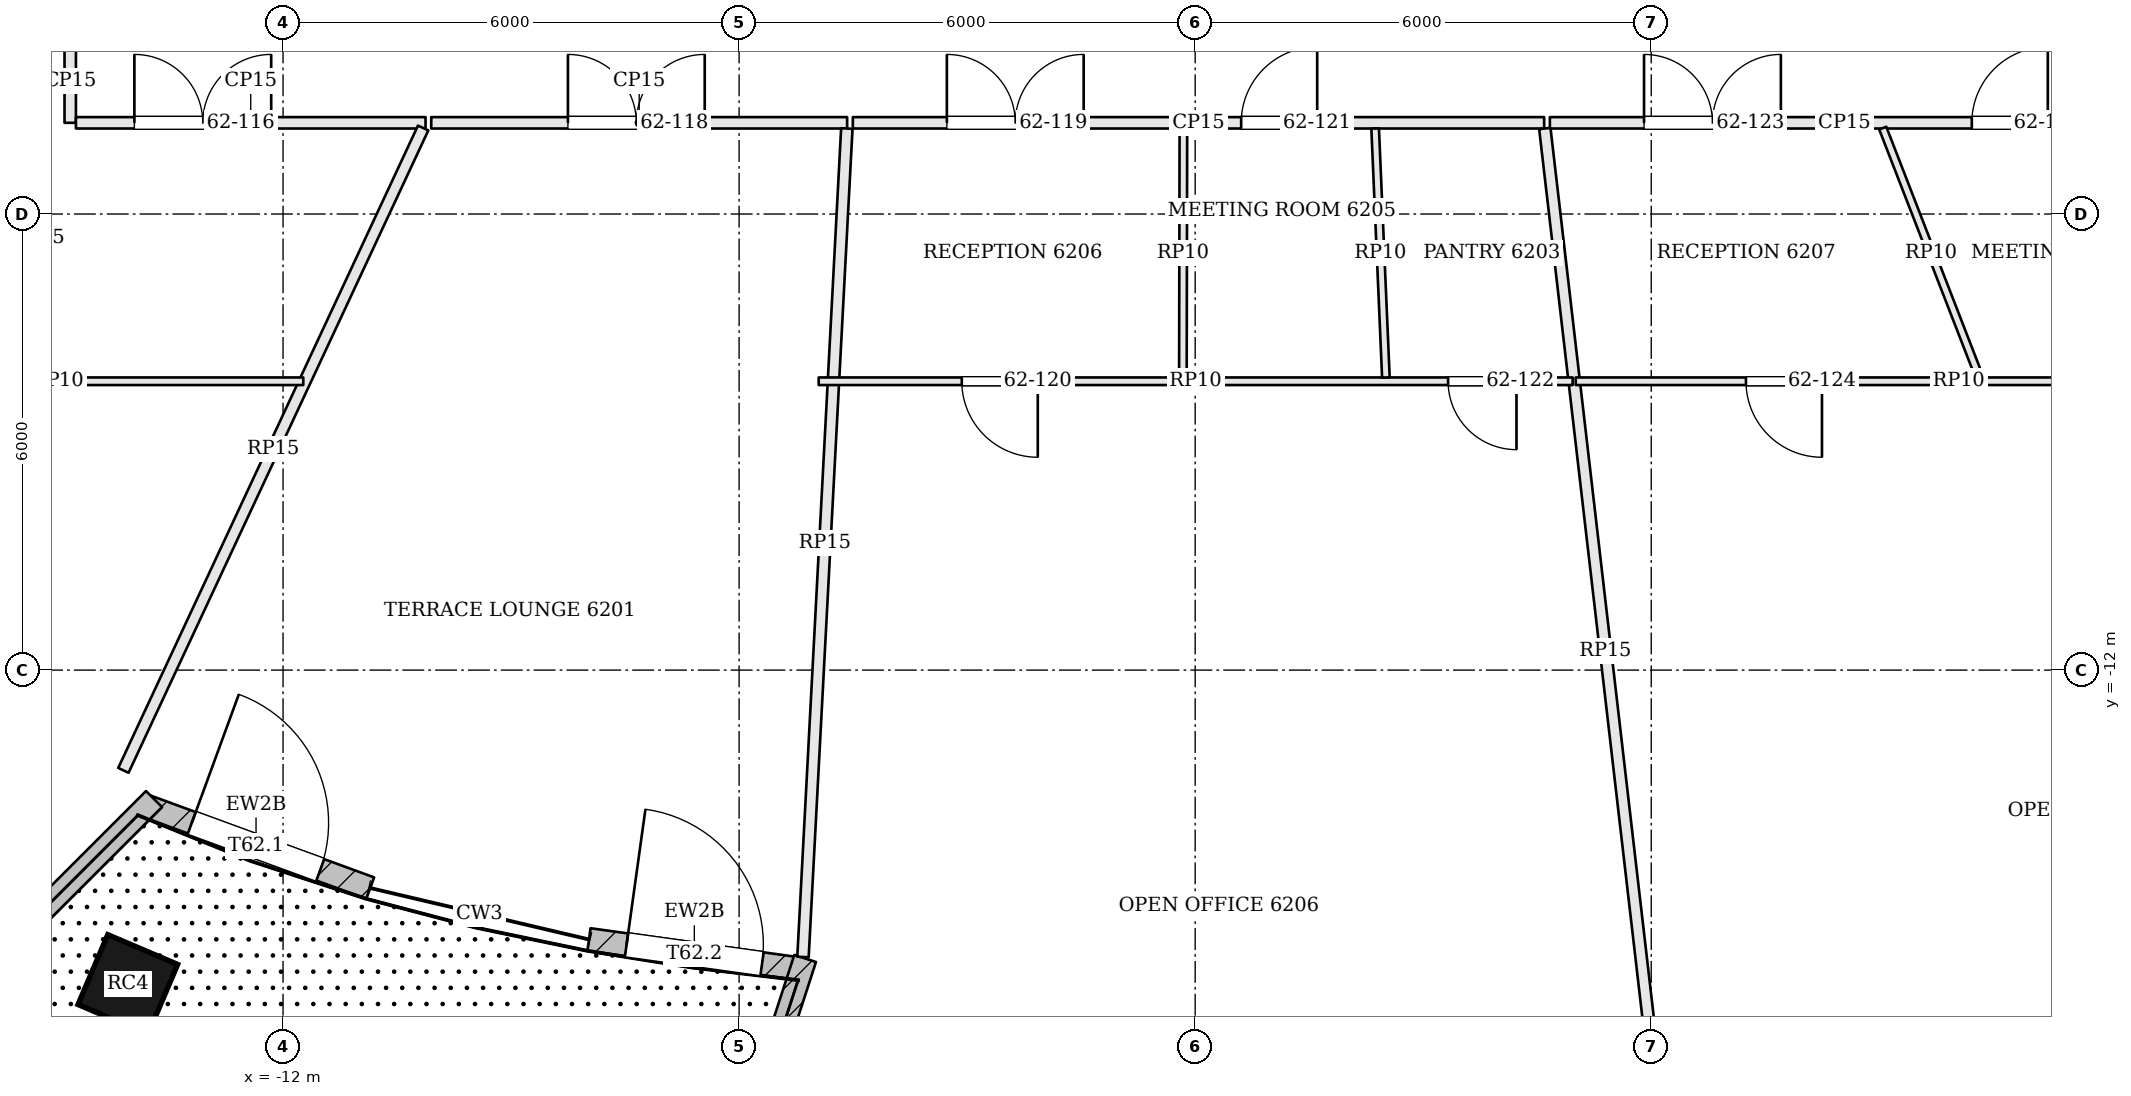
"""IFC4 building model, lengths in metres.
Left out: names, types, materials, properties, quantities, classifications, styles, units other than length and angle.
Written with IfcOpenShell. Run it as: python <this file> out.ifc"""

import sys

from ifc_helpers import new_model, si_unit, direction, frame, frame_2d, origin, origin_2d, place, context, subcontext, project, spatial, rectangle, extrude, element, fill, save


model = new_model("IFC4")
c1 = context("Model", 3, precision=1e-05, world=origin(), true_north=direction((0.0, 1.0)))
c2 = subcontext(c1, "Body", "Model", "MODEL_VIEW")
j1 = project(units=[si_unit("LENGTHUNIT", "METRE"), si_unit("PLANEANGLEUNIT", "RADIAN")], contexts=[c1])
p1 = place(None, origin())
s1 = spatial("IfcSite", under=j1, at=p1, CompositionType="ELEMENT")
p2 = place(p1, origin())
s2 = spatial("IfcBuilding", under=s1, at=p2, CompositionType="ELEMENT")
p3 = place(p2, frame((0.0, 0.0, 252.6)))
s3 = spatial("IfcBuildingStorey", under=s2, at=p3, CompositionType="ELEMENT", Elevation=252.6)
p4 = place(p3, frame((-14.042, -16.136, 0.0), z_axis=(0.0, 0.0, 1.0), x_axis=(0.920167856842, -0.391524092789, 0.0)))
e1 = element("IfcColumn", 1, at=p4, inside=s3, PredefinedType="COLUMN", context=c2, shape_type="SweptSolid", body=[
    extrude(rectangle(XDim=1.0, YDim=1.0, at=origin_2d()), origin(), (0.0, 0.0, 1.0), 3.9),
])
p5 = place(p3, frame((-13.857, -13.768, 0.0), z_axis=(0.0, 0.0, 1.0), x_axis=(0.939035731174, -0.343819568347, 0.0)))
e2 = element("IfcWall", 2, at=p5, inside=s3, PredefinedType="SOLIDWALL", context=c2, shape_type="SweptSolid", body=[
    extrude(rectangle(XDim=3.199, YDim=0.3, at=frame_2d((1.6, 0.0))), origin(), (0.0, 0.0, 1.0), 3.104),
])
p6 = place(p5, frame((0.699, 0.0, 0.0)))
e3 = element("IfcOpeningElement", 3, at=p6, cuts=e2, PredefinedType="OPENING", context=c2, shape_type="SweptSolid", body=[
    extrude(rectangle(XDim=1.8, YDim=2.4, at=frame_2d((0.9, 1.2))), frame((0.0, 0.16, 0.0), z_axis=(0.0, -1.0, 0.0), x_axis=(1.0, 0.0, 0.0)), (0.0, 0.0, 1.0), 0.32),
])
p7 = place(p3, frame((-7.975, -15.544, 0.0), z_axis=(0.0, 0.0, 1.0), x_axis=(0.990444006368, -0.137915446016, 0.0)))
e4 = element("IfcWall", 4, at=p7, inside=s3, PredefinedType="SOLIDWALL", context=c2, shape_type="SweptSolid", body=[
    extrude(rectangle(XDim=2.799, YDim=0.3, at=frame_2d((1.399, 0.0))), origin(), (0.0, 0.0, 1.0), 3.104),
])
p8 = place(p7, frame((0.5, 0.0, 0.0)))
e5 = element("IfcOpeningElement", 5, at=p8, cuts=e4, PredefinedType="OPENING", context=c2, shape_type="SweptSolid", body=[
    extrude(rectangle(XDim=1.8, YDim=2.4, at=frame_2d((0.9, 1.2))), frame((0.0, 0.16, 0.0), z_axis=(0.0, -1.0, 0.0), x_axis=(1.0, 0.0, 0.0)), (0.0, 0.0, 1.0), 0.32),
])
p9 = place(p3, frame((-17.976, -17.976, 0.0), z_axis=(0.0, 0.0, 1.0), x_axis=(0.707106781187, 0.707106781187, 0.0)))
e6 = element("IfcWall", 6, at=p9, inside=s3, PredefinedType="SOLIDWALL", context=c2, shape_type="SweptSolid", body=[
    extrude(rectangle(XDim=6.052, YDim=0.3, at=frame_2d((3.026, 0.0))), origin(), (0.0, 0.0, 1.0), 3.254),
])
p10 = place(p3, frame((-7.051, -21.701, 0.0), z_axis=(0.0, 0.0, 1.0), x_axis=(0.309061186731, 0.951042156193, 0.0)))
e7 = element("IfcWall", 7, at=p10, inside=s3, PredefinedType="SOLIDWALL", context=c2, shape_type="SweptSolid", body=[
    extrude(rectangle(XDim=6.211, YDim=0.3, at=frame_2d((3.106, 0.0))), origin(), (0.0, 0.0, 1.0), 3.254),
])
p11 = place(p3, frame((-24.363, -8.04, 0.0), z_axis=(0.0, 0.0, 1.0), x_axis=(0.907507429398, 0.420036028916, 0.0)))
e8 = element("IfcWall", 8, at=p11, inside=s3, PredefinedType="PARTITIONING", context=c2, shape_type="SweptSolid", body=[
    extrude(rectangle(XDim=10.463, YDim=0.15, at=frame_2d((5.231, 0.0))), origin(), (0.0, 0.0, 1.0), 3.084),
])
p12 = place(p3, frame((-14.8, -3.688, 0.0), z_axis=(0.0, 0.0, 1.0), x_axis=(0.0, -1.0, 0.0)))
e9 = element("IfcWall", 9, at=p12, inside=s3, PredefinedType="PARTITIONING", context=c2, shape_type="SweptSolid", body=[
    extrude(rectangle(XDim=1.112, YDim=0.15, at=frame_2d((0.556, 0.0))), origin(), (0.0, 0.0, 1.0), 3.084),
])
p13 = place(p3, frame((-14.725, -4.8, 0.0), z_axis=(0.0, 0.0, 1.0), x_axis=(1.0, 0.0, 0.0)))
e10 = element("IfcWall", 10, at=p13, inside=s3, PredefinedType="PARTITIONING", context=c2, shape_type="SweptSolid", body=[
    extrude(rectangle(XDim=4.6, YDim=0.15, at=frame_2d((2.3, 0.0))), origin(), (0.0, 0.0, 1.0), 3.084),
])
p14 = place(p13, frame((0.769, 0.0, 0.0)))
e11 = element("IfcOpeningElement", 11, at=p14, cuts=e10, PredefinedType="OPENING", context=c2, shape_type="SweptSolid", body=[
    extrude(rectangle(XDim=1.8, YDim=2.1, at=frame_2d((0.9, 1.05))), frame((0.0, 0.085, 0.0), z_axis=(0.0, -1.0, 0.0), x_axis=(1.0, 0.0, 0.0)), (0.0, 0.0, 1.0), 0.17),
])
p15 = place(p3, frame((-14.1, -13.319, 0.0), z_axis=(0.0, 0.0, 1.0), x_axis=(0.422849635533, 0.906199859705, 0.0)))
e12 = element("IfcWall", 12, at=p15, inside=s3, PredefinedType="PARTITIONING", context=c2, shape_type="SweptSolid", body=[
    extrude(rectangle(XDim=9.326, YDim=0.15, at=frame_2d((4.663, 0.0))), origin(), (0.0, 0.0, 1.0), 3.084),
])
p16 = place(p3, frame((-10.05, -4.8, 0.0), z_axis=(0.0, 0.0, 1.0), x_axis=(1.0, 0.0, 0.0)))
e13 = element("IfcWall", 13, at=p16, inside=s3, PredefinedType="PARTITIONING", context=c2, shape_type="SweptSolid", body=[
    extrude(rectangle(XDim=5.471, YDim=0.15, at=frame_2d((2.736, 0.0))), origin(), (0.0, 0.0, 1.0), 3.084),
])
p17 = place(p16, frame((1.798, 0.0, 0.0)))
e14 = element("IfcOpeningElement", 14, at=p17, cuts=e13, PredefinedType="OPENING", context=c2, shape_type="SweptSolid", body=[
    extrude(rectangle(XDim=1.8, YDim=2.1, at=frame_2d((0.9, 1.05))), frame((0.0, 0.085, 0.0), z_axis=(0.0, -1.0, 0.0), x_axis=(1.0, 0.0, 0.0)), (0.0, 0.0, 1.0), 0.17),
])
p18 = place(p3, frame((-5.16, -15.774, 0.0), z_axis=(0.0, 0.0, 1.0), x_axis=(0.052855857128, 0.998602152194, 0.0)))
e15 = element("IfcWall", 15, at=p18, inside=s3, PredefinedType="PARTITIONING", context=c2, shape_type="SweptSolid", body=[
    extrude(rectangle(XDim=10.915, YDim=0.15, at=frame_2d((5.457, 0.0))), origin(), (0.0, 0.0, 1.0), 3.084),
])
p19 = place(p3, frame((-4.504, -4.8, 0.0), z_axis=(0.0, 0.0, 1.0), x_axis=(1.0, 0.0, 0.0)))
e16 = element("IfcWall", 16, at=p19, inside=s3, PredefinedType="PARTITIONING", context=c2, shape_type="SweptSolid", body=[
    extrude(rectangle(XDim=9.095, YDim=0.15, at=frame_2d((4.548, 0.0))), origin(), (0.0, 0.0, 1.0), 3.084),
])
p20 = place(p19, frame((1.237, 0.0, 0.0)))
e17 = element("IfcOpeningElement", 17, at=p20, cuts=e16, PredefinedType="OPENING", context=c2, shape_type="SweptSolid", body=[
    extrude(rectangle(XDim=1.8, YDim=2.1, at=frame_2d((0.9, 1.05))), frame((0.0, 0.085, 0.0), z_axis=(0.0, -1.0, 0.0), x_axis=(1.0, 0.0, 0.0)), (0.0, 0.0, 1.0), 0.17),
])
p21 = place(p19, frame((5.109, 0.0, 0.0)))
e18 = element("IfcOpeningElement", 18, at=p21, cuts=e16, PredefinedType="OPENING", context=c2, shape_type="SweptSolid", body=[
    extrude(rectangle(XDim=1.0, YDim=2.4, at=frame_2d((0.5, 1.2))), frame((0.0, 0.085, 0.0), z_axis=(0.0, -1.0, 0.0), x_axis=(1.0, 0.0, 0.0)), (0.0, 0.0, 1.0), 0.17),
])
p22 = place(p3, frame((6.197, -18.616, 0.0), z_axis=(0.0, 0.0, 1.0), x_axis=(-0.115396385648, 0.993319522701, 0.0)))
e19 = element("IfcWall", 19, at=p22, inside=s3, PredefinedType="PARTITIONING", context=c2, shape_type="SweptSolid", body=[
    extrude(rectangle(XDim=13.834, YDim=0.15, at=frame_2d((6.917, 0.0))), origin(), (0.0, 0.0, 1.0), 3.084),
])
p23 = place(p3, frame((4.667, -4.8, 0.0), z_axis=(0.0, 0.0, 1.0), x_axis=(1.0, 0.0, 0.0)))
e20 = element("IfcWall", 20, at=p23, inside=s3, PredefinedType="PARTITIONING", context=c2, shape_type="SweptSolid", body=[
    extrude(rectangle(XDim=7.75, YDim=0.15, at=frame_2d((3.875, 0.0))), origin(), (0.0, 0.0, 1.0), 3.084),
])
p24 = place(p23, frame((1.239, 0.0, 0.0)))
e21 = element("IfcOpeningElement", 21, at=p24, cuts=e20, PredefinedType="OPENING", context=c2, shape_type="SweptSolid", body=[
    extrude(rectangle(XDim=1.8, YDim=2.1, at=frame_2d((0.9, 1.05))), frame((0.0, 0.085, 0.0), z_axis=(0.0, -1.0, 0.0), x_axis=(1.0, 0.0, 0.0)), (0.0, 0.0, 1.0), 0.17),
])
p25 = place(p23, frame((5.551, 0.0, 0.0)))
e22 = element("IfcOpeningElement", 22, at=p25, cuts=e20, PredefinedType="OPENING", context=c2, shape_type="SweptSolid", body=[
    extrude(rectangle(XDim=1.0, YDim=2.4, at=frame_2d((0.5, 1.2))), frame((0.0, 0.085, 0.0), z_axis=(0.0, -1.0, 0.0), x_axis=(1.0, 0.0, 0.0)), (0.0, 0.0, 1.0), 0.17),
])
p26 = place(p3, frame((-11.734, -8.2, 0.0), z_axis=(0.0, 0.0, 1.0), x_axis=(-1.0, 0.0, 0.0)))
e23 = element("IfcWall", 23, at=p26, inside=s3, PredefinedType="PARTITIONING", context=c2, shape_type="SweptSolid", body=[
    extrude(rectangle(XDim=6.466, YDim=0.1, at=frame_2d((3.233, 0.0))), origin(), (0.0, 0.0, 1.0), 3.084),
])
p27 = place(p26, frame((4.233, 0.0, 0.0)))
e24 = element("IfcOpeningElement", 24, at=p27, cuts=e23, PredefinedType="OPENING", context=c2, shape_type="SweptSolid", body=[
    extrude(rectangle(XDim=1.0, YDim=2.1, at=frame_2d((0.5, 1.05))), frame((0.0, 0.06, 0.0), z_axis=(0.0, -1.0, 0.0), x_axis=(1.0, 0.0, 0.0)), (0.0, 0.0, 1.0), 0.12),
])
p28 = place(p3, frame((4.966, -8.2, 0.0), z_axis=(0.0, 0.0, 1.0), x_axis=(-1.0, 0.0, 0.0)))
e25 = element("IfcWall", 25, at=p28, inside=s3, PredefinedType="PARTITIONING", context=c2, shape_type="SweptSolid", body=[
    extrude(rectangle(XDim=9.919, YDim=0.1, at=frame_2d((4.959, 0.0))), origin(), (0.0, 0.0, 1.0), 3.084),
])
p29 = place(p28, frame((7.037, 0.0, 0.0)))
e26 = element("IfcOpeningElement", 26, at=p29, cuts=e25, PredefinedType="OPENING", context=c2, shape_type="SweptSolid", body=[
    extrude(rectangle(XDim=1.0, YDim=2.1, at=frame_2d((0.5, 1.05))), frame((0.0, 0.06, 0.0), z_axis=(0.0, -1.0, 0.0), x_axis=(1.0, 0.0, 0.0)), (0.0, 0.0, 1.0), 0.12),
])
p30 = place(p28, frame((0.739, 0.0, 0.0)))
e27 = element("IfcOpeningElement", 27, at=p30, cuts=e25, PredefinedType="OPENING", context=c2, shape_type="SweptSolid", body=[
    extrude(rectangle(XDim=0.9, YDim=2.1, at=frame_2d((0.45, 1.05))), frame((0.0, 0.06, 0.0), z_axis=(0.0, -1.0, 0.0), x_axis=(1.0, 0.0, 0.0)), (0.0, 0.0, 1.0), 0.12),
])
p31 = place(p3, frame((-0.155, -4.875, 0.0), z_axis=(0.0, 0.0, 1.0), x_axis=(-0.002012818347, -0.999997974279, 0.0)))
e28 = element("IfcWall", 28, at=p31, inside=s3, PredefinedType="PARTITIONING", context=c2, shape_type="SweptSolid", body=[
    extrude(rectangle(XDim=3.275, YDim=0.1, at=frame_2d((1.637, 0.0))), origin(), (0.0, 0.0, 1.0), 3.084),
])
p32 = place(p3, frame((2.368, -4.875, 0.0), z_axis=(0.0, 0.0, 1.0), x_axis=(0.043123705059, -0.999069740339, 0.0)))
e29 = element("IfcWall", 29, at=p32, inside=s3, PredefinedType="PARTITIONING", context=c2, shape_type="SweptSolid", body=[
    extrude(rectangle(XDim=3.278, YDim=0.1, at=frame_2d((1.639, 0.0))), origin(), (0.0, 0.0, 1.0), 3.084),
])
p33 = place(p3, frame((15.087, -8.2, 0.0), z_axis=(0.0, 0.0, 1.0), x_axis=(-1.0, 0.0, 0.0)))
e30 = element("IfcWall", 30, at=p33, inside=s3, PredefinedType="PARTITIONING", context=c2, shape_type="SweptSolid", body=[
    extrude(rectangle(XDim=10.081, YDim=0.1, at=frame_2d((5.041, 0.0))), origin(), (0.0, 0.0, 1.0), 3.084),
])
p34 = place(p33, frame((6.841, 0.0, 0.0)))
e31 = element("IfcOpeningElement", 31, at=p34, cuts=e30, PredefinedType="OPENING", context=c2, shape_type="SweptSolid", body=[
    extrude(rectangle(XDim=1.0, YDim=2.1, at=frame_2d((0.5, 1.05))), frame((0.0, 0.06, 0.0), z_axis=(0.0, -1.0, 0.0), x_axis=(1.0, 0.0, 0.0)), (0.0, 0.0, 1.0), 0.12),
])
p35 = place(p3, frame((9.046, -4.87, 0.0), z_axis=(0.0, 0.0, 1.0), x_axis=(0.361773794961, -0.93226590696, 0.0)))
e32 = element("IfcWall", 32, at=p35, inside=s3, PredefinedType="PARTITIONING", context=c2, shape_type="SweptSolid", body=[
    extrude(rectangle(XDim=3.522, YDim=0.1, at=frame_2d((1.761, 0.0))), origin(), (0.0, 0.0, 1.0), 3.084),
])
p36 = place(p6, origin())
e33 = element("IfcDoor", 33, at=p36, inside=s3, OperationType="DOUBLE_DOOR_DOUBLE_SWING", PredefinedType="DOOR", context=c2, shape_type="SweptSolid", body=[
    extrude(rectangle(XDim=1.8, YDim=2.4, at=frame_2d((0.9, 1.2))), frame((0.0, 0.025, 0.0), z_axis=(0.0, -1.0, 0.0), x_axis=(1.0, 0.0, 0.0)), (0.0, 0.0, 1.0), 0.05),
])
fill(e3, e33)
p37 = place(p8, origin())
e34 = element("IfcDoor", 34, at=p37, inside=s3, OperationType="DOUBLE_DOOR_DOUBLE_SWING", PredefinedType="DOOR", context=c2, shape_type="SweptSolid", body=[
    extrude(rectangle(XDim=1.8, YDim=2.4, at=frame_2d((0.9, 1.2))), frame((0.0, 0.025, 0.0), z_axis=(0.0, -1.0, 0.0), x_axis=(1.0, 0.0, 0.0)), (0.0, 0.0, 1.0), 0.05),
])
fill(e5, e34)
p38 = place(p14, origin())
e35 = element("IfcDoor", 35, at=p38, inside=s3, OperationType="DOUBLE_DOOR_SINGLE_SWING", PredefinedType="DOOR", context=c2, shape_type="SweptSolid", body=[
    extrude(rectangle(XDim=1.8, YDim=2.1, at=frame_2d((0.9, 1.05))), frame((0.0, 0.025, 0.0), z_axis=(0.0, -1.0, 0.0), x_axis=(1.0, 0.0, 0.0)), (0.0, 0.0, 1.0), 0.05),
])
fill(e11, e35)
p39 = place(p17, origin())
e36 = element("IfcDoor", 36, at=p39, inside=s3, OperationType="DOUBLE_DOOR_SINGLE_SWING", PredefinedType="DOOR", context=c2, shape_type="SweptSolid", body=[
    extrude(rectangle(XDim=1.8, YDim=2.1, at=frame_2d((0.9, 1.05))), frame((0.0, 0.025, 0.0), z_axis=(0.0, -1.0, 0.0), x_axis=(1.0, 0.0, 0.0)), (0.0, 0.0, 1.0), 0.05),
])
fill(e14, e36)
p40 = place(p20, origin())
e37 = element("IfcDoor", 37, at=p40, inside=s3, OperationType="DOUBLE_DOOR_SINGLE_SWING", PredefinedType="DOOR", context=c2, shape_type="SweptSolid", body=[
    extrude(rectangle(XDim=1.8, YDim=2.1, at=frame_2d((0.9, 1.05))), frame((0.0, 0.025, 0.0), z_axis=(0.0, -1.0, 0.0), x_axis=(1.0, 0.0, 0.0)), (0.0, 0.0, 1.0), 0.05),
])
fill(e17, e37)
p41 = place(p29, origin())
e38 = element("IfcDoor", 38, at=p41, inside=s3, OperationType="SINGLE_SWING_LEFT", PredefinedType="DOOR", context=c2, shape_type="SweptSolid", body=[
    extrude(rectangle(XDim=1.0, YDim=2.1, at=frame_2d((0.5, 1.05))), frame((0.0, 0.025, 0.0), z_axis=(0.0, -1.0, 0.0), x_axis=(1.0, 0.0, 0.0)), (0.0, 0.0, 1.0), 0.05),
])
fill(e26, e38)
p42 = place(p21, origin())
e39 = element("IfcDoor", 39, at=p42, inside=s3, OperationType="SINGLE_SWING_RIGHT", PredefinedType="DOOR", context=c2, shape_type="SweptSolid", body=[
    extrude(rectangle(XDim=1.0, YDim=2.4, at=frame_2d((0.5, 1.2))), frame((0.0, 0.025, 0.0), z_axis=(0.0, -1.0, 0.0), x_axis=(1.0, 0.0, 0.0)), (0.0, 0.0, 1.0), 0.05),
])
fill(e18, e39)
p43 = place(p30, origin())
e40 = element("IfcDoor", 40, at=p43, inside=s3, OperationType="SINGLE_SWING_LEFT", PredefinedType="DOOR", context=c2, shape_type="SweptSolid", body=[
    extrude(rectangle(XDim=0.9, YDim=2.1, at=frame_2d((0.45, 1.05))), frame((0.0, 0.025, 0.0), z_axis=(0.0, -1.0, 0.0), x_axis=(1.0, 0.0, 0.0)), (0.0, 0.0, 1.0), 0.05),
])
fill(e27, e40)
p44 = place(p24, origin())
e41 = element("IfcDoor", 41, at=p44, inside=s3, OperationType="DOUBLE_DOOR_SINGLE_SWING", PredefinedType="DOOR", context=c2, shape_type="SweptSolid", body=[
    extrude(rectangle(XDim=1.8, YDim=2.1, at=frame_2d((0.9, 1.05))), frame((0.0, 0.025, 0.0), z_axis=(0.0, -1.0, 0.0), x_axis=(1.0, 0.0, 0.0)), (0.0, 0.0, 1.0), 0.05),
])
fill(e21, e41)
p45 = place(p34, origin())
e42 = element("IfcDoor", 42, at=p45, inside=s3, OperationType="SINGLE_SWING_LEFT", PredefinedType="DOOR", context=c2, shape_type="SweptSolid", body=[
    extrude(rectangle(XDim=1.0, YDim=2.1, at=frame_2d((0.5, 1.05))), frame((0.0, 0.025, 0.0), z_axis=(0.0, -1.0, 0.0), x_axis=(1.0, 0.0, 0.0)), (0.0, 0.0, 1.0), 0.05),
])
fill(e31, e42)
p46 = place(p25, origin())
e43 = element("IfcDoor", 43, at=p46, inside=s3, OperationType="SINGLE_SWING_RIGHT", PredefinedType="DOOR", context=c2, shape_type="SweptSolid", body=[
    extrude(rectangle(XDim=1.0, YDim=2.4, at=frame_2d((0.5, 1.2))), frame((0.0, 0.025, 0.0), z_axis=(0.0, -1.0, 0.0), x_axis=(1.0, 0.0, 0.0)), (0.0, 0.0, 1.0), 0.05),
])
fill(e22, e43)
save(model, sys.argv[1])
